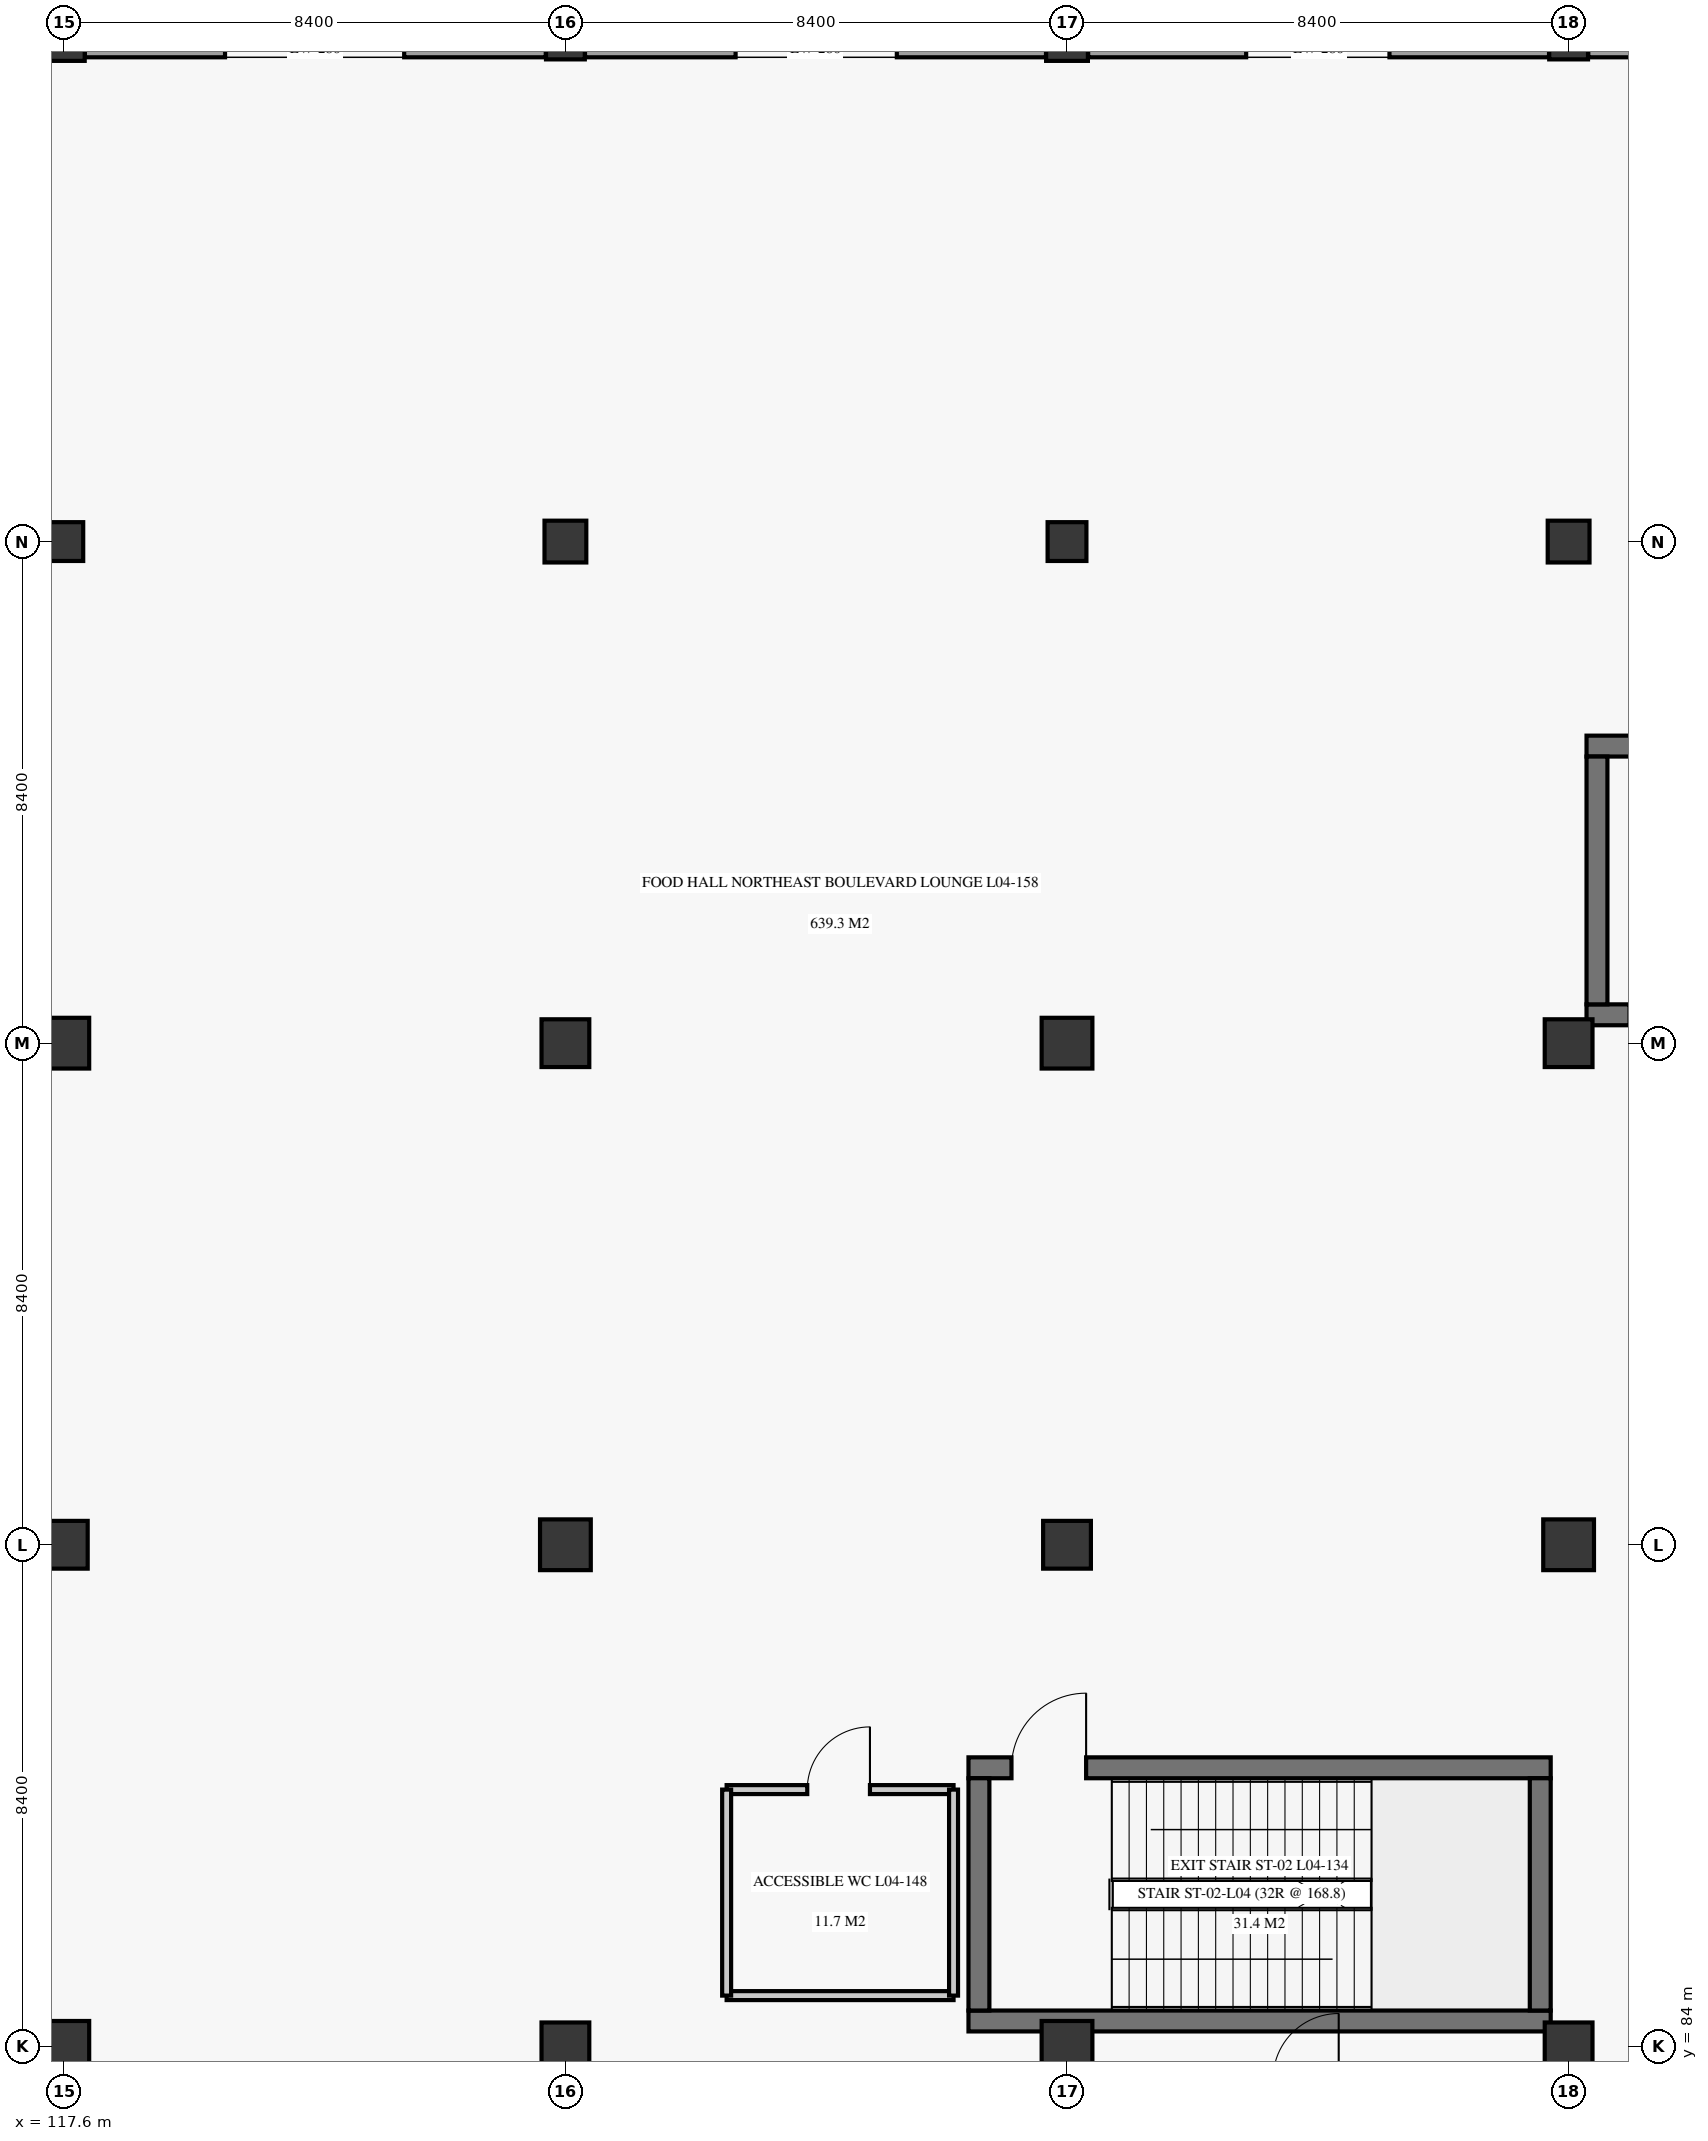
"""IFC4 building model, lengths in metres.
Left out: names, types, materials, properties, quantities, classifications, styles, units other than length and angle.
Written with IfcOpenShell. Run it as: python <this file> out.ifc"""

import sys

from ifc_helpers import new_model, si_unit, direction, frame, frame_2d, origin, origin_2d, place, context, subcontext, project, spatial, rectangle, extrude, element, fill, save


model = new_model("IFC4")
c1 = context("Model", 3, precision=1e-05, world=origin(), true_north=direction((0.0, 1.0)))
c2 = subcontext(c1, "Body", "Model", "MODEL_VIEW")
j1 = project(units=[si_unit("LENGTHUNIT", "METRE"), si_unit("PLANEANGLEUNIT", "RADIAN")], contexts=[c1])
p1 = place(None, origin())
s1 = spatial("IfcSite", under=j1, at=p1, CompositionType="ELEMENT")
p2 = place(p1, origin())
s2 = spatial("IfcBuilding", under=s1, at=p2, CompositionType="ELEMENT")
p3 = place(p2, frame((0.0, 0.0, 16.8)))
s3 = spatial("IfcBuildingStorey", under=s2, at=p3, CompositionType="ELEMENT", Elevation=16.8)
p4 = place(p3, frame((117.6, 84.0, 0.0), z_axis=(0.0, 0.0, 1.0), x_axis=(1.0, 0.0, 0.0)))
e1 = element("IfcColumn", 1, at=p4, inside=s3, PredefinedType="COLUMN", context=c2, shape_type="SweptSolid", body=[
    extrude(rectangle(XDim=0.85, YDim=0.85, at=origin_2d()), origin(), (0.0, 0.0, 1.0), 5.1),
])
p5 = place(p3, frame((117.6, 92.4, 0.0), z_axis=(0.0, 0.0, 1.0), x_axis=(1.0, 0.0, 0.0)))
e2 = element("IfcColumn", 2, at=p5, inside=s3, PredefinedType="COLUMN", context=c2, shape_type="SweptSolid", body=[
    extrude(rectangle(XDim=0.8, YDim=0.8, at=origin_2d()), origin(), (0.0, 0.0, 1.0), 5.1),
])
p6 = place(p3, frame((117.6, 100.8, 0.0), z_axis=(0.0, 0.0, 1.0), x_axis=(1.0, 0.0, 0.0)))
e3 = element("IfcColumn", 3, at=p6, inside=s3, PredefinedType="COLUMN", context=c2, shape_type="SweptSolid", body=[
    extrude(rectangle(XDim=0.85, YDim=0.85, at=origin_2d()), origin(), (0.0, 0.0, 1.0), 5.1),
])
p7 = place(p3, frame((117.6, 109.2, 0.0), z_axis=(0.0, 0.0, 1.0), x_axis=(1.0, 0.0, 0.0)))
e4 = element("IfcColumn", 4, at=p7, inside=s3, PredefinedType="COLUMN", context=c2, shape_type="SweptSolid", body=[
    extrude(rectangle(XDim=0.65, YDim=0.65, at=origin_2d()), origin(), (0.0, 0.0, 1.0), 5.1),
])
p8 = place(p3, frame((117.6, 117.6, 0.0), z_axis=(0.0, 0.0, 1.0), x_axis=(1.0, 0.0, 0.0)))
e5 = element("IfcColumn", 5, at=p8, inside=s3, PredefinedType="COLUMN", context=c2, shape_type="SweptSolid", body=[
    extrude(rectangle(XDim=0.7, YDim=0.7, at=origin_2d()), origin(), (0.0, 0.0, 1.0), 5.1),
])
p9 = place(p3, frame((126.0, 84.0, 0.0), z_axis=(0.0, 0.0, 1.0), x_axis=(1.0, 0.0, 0.0)))
e6 = element("IfcColumn", 6, at=p9, inside=s3, PredefinedType="COLUMN", context=c2, shape_type="SweptSolid", body=[
    extrude(rectangle(XDim=0.8, YDim=0.8, at=origin_2d()), origin(), (0.0, 0.0, 1.0), 5.1),
])
p10 = place(p3, frame((126.0, 92.4, 0.0), z_axis=(0.0, 0.0, 1.0), x_axis=(1.0, 0.0, 0.0)))
e7 = element("IfcColumn", 7, at=p10, inside=s3, PredefinedType="COLUMN", context=c2, shape_type="SweptSolid", body=[
    extrude(rectangle(XDim=0.85, YDim=0.85, at=origin_2d()), origin(), (0.0, 0.0, 1.0), 5.1),
])
p11 = place(p3, frame((126.0, 100.8, 0.0), z_axis=(0.0, 0.0, 1.0), x_axis=(1.0, 0.0, 0.0)))
e8 = element("IfcColumn", 8, at=p11, inside=s3, PredefinedType="COLUMN", context=c2, shape_type="SweptSolid", body=[
    extrude(rectangle(XDim=0.8, YDim=0.8, at=origin_2d()), origin(), (0.0, 0.0, 1.0), 5.1),
])
p12 = place(p3, frame((126.0, 109.2, 0.0), z_axis=(0.0, 0.0, 1.0), x_axis=(1.0, 0.0, 0.0)))
e9 = element("IfcColumn", 9, at=p12, inside=s3, PredefinedType="COLUMN", context=c2, shape_type="SweptSolid", body=[
    extrude(rectangle(XDim=0.7, YDim=0.7, at=origin_2d()), origin(), (0.0, 0.0, 1.0), 5.1),
])
p13 = place(p3, frame((126.0, 117.6, 0.0), z_axis=(0.0, 0.0, 1.0), x_axis=(1.0, 0.0, 0.0)))
e10 = element("IfcColumn", 10, at=p13, inside=s3, PredefinedType="COLUMN", context=c2, shape_type="SweptSolid", body=[
    extrude(rectangle(XDim=0.65, YDim=0.65, at=origin_2d()), origin(), (0.0, 0.0, 1.0), 5.1),
])
p14 = place(p3, frame((134.4, 84.0, 0.0), z_axis=(0.0, 0.0, 1.0), x_axis=(1.0, 0.0, 0.0)))
e11 = element("IfcColumn", 11, at=p14, inside=s3, PredefinedType="COLUMN", context=c2, shape_type="SweptSolid", body=[
    extrude(rectangle(XDim=0.85, YDim=0.85, at=origin_2d()), origin(), (0.0, 0.0, 1.0), 5.1),
])
p15 = place(p3, frame((134.4, 92.4, 0.0), z_axis=(0.0, 0.0, 1.0), x_axis=(1.0, 0.0, 0.0)))
e12 = element("IfcColumn", 12, at=p15, inside=s3, PredefinedType="COLUMN", context=c2, shape_type="SweptSolid", body=[
    extrude(rectangle(XDim=0.8, YDim=0.8, at=origin_2d()), origin(), (0.0, 0.0, 1.0), 5.1),
])
p16 = place(p3, frame((134.4, 100.8, 0.0), z_axis=(0.0, 0.0, 1.0), x_axis=(1.0, 0.0, 0.0)))
e13 = element("IfcColumn", 13, at=p16, inside=s3, PredefinedType="COLUMN", context=c2, shape_type="SweptSolid", body=[
    extrude(rectangle(XDim=0.85, YDim=0.85, at=origin_2d()), origin(), (0.0, 0.0, 1.0), 5.1),
])
p17 = place(p3, frame((134.4, 109.2, 0.0), z_axis=(0.0, 0.0, 1.0), x_axis=(1.0, 0.0, 0.0)))
e14 = element("IfcColumn", 14, at=p17, inside=s3, PredefinedType="COLUMN", context=c2, shape_type="SweptSolid", body=[
    extrude(rectangle(XDim=0.65, YDim=0.65, at=origin_2d()), origin(), (0.0, 0.0, 1.0), 5.1),
])
p18 = place(p3, frame((134.4, 117.6, 0.0), z_axis=(0.0, 0.0, 1.0), x_axis=(1.0, 0.0, 0.0)))
e15 = element("IfcColumn", 15, at=p18, inside=s3, PredefinedType="COLUMN", context=c2, shape_type="SweptSolid", body=[
    extrude(rectangle(XDim=0.7, YDim=0.7, at=origin_2d()), origin(), (0.0, 0.0, 1.0), 5.1),
])
p19 = place(p3, frame((142.8, 84.0, 0.0), z_axis=(0.0, 0.0, 1.0), x_axis=(1.0, 0.0, 0.0)))
e16 = element("IfcColumn", 16, at=p19, inside=s3, PredefinedType="COLUMN", context=c2, shape_type="SweptSolid", body=[
    extrude(rectangle(XDim=0.8, YDim=0.8, at=origin_2d()), origin(), (0.0, 0.0, 1.0), 5.1),
])
p20 = place(p3, frame((142.8, 92.4, 0.0), z_axis=(0.0, 0.0, 1.0), x_axis=(1.0, 0.0, 0.0)))
e17 = element("IfcColumn", 17, at=p20, inside=s3, PredefinedType="COLUMN", context=c2, shape_type="SweptSolid", body=[
    extrude(rectangle(XDim=0.85, YDim=0.85, at=origin_2d()), origin(), (0.0, 0.0, 1.0), 5.1),
])
p21 = place(p3, frame((142.8, 100.8, 0.0), z_axis=(0.0, 0.0, 1.0), x_axis=(1.0, 0.0, 0.0)))
e18 = element("IfcColumn", 18, at=p21, inside=s3, PredefinedType="COLUMN", context=c2, shape_type="SweptSolid", body=[
    extrude(rectangle(XDim=0.8, YDim=0.8, at=origin_2d()), origin(), (0.0, 0.0, 1.0), 5.1),
])
p22 = place(p3, frame((142.8, 109.2, 0.0), z_axis=(0.0, 0.0, 1.0), x_axis=(1.0, 0.0, 0.0)))
e19 = element("IfcColumn", 19, at=p22, inside=s3, PredefinedType="COLUMN", context=c2, shape_type="SweptSolid", body=[
    extrude(rectangle(XDim=0.7, YDim=0.7, at=origin_2d()), origin(), (0.0, 0.0, 1.0), 5.1),
])
p23 = place(p3, frame((142.8, 117.6, 0.0), z_axis=(0.0, 0.0, 1.0), x_axis=(1.0, 0.0, 0.0)))
e20 = element("IfcColumn", 20, at=p23, inside=s3, PredefinedType="COLUMN", context=c2, shape_type="SweptSolid", body=[
    extrude(rectangle(XDim=0.65, YDim=0.65, at=origin_2d()), origin(), (0.0, 0.0, 1.0), 5.1),
])
p24 = place(p3, frame((117.952, 117.45, 0.0), z_axis=(0.0, 0.0, 1.0), x_axis=(1.0, 0.0, 0.0)))
e21 = element("IfcWall", 21, at=p24, inside=s3, PredefinedType="SOLIDWALL", context=c2, shape_type="SweptSolid", body=[
    extrude(rectangle(XDim=7.72, YDim=0.28, at=frame_2d((3.86, 0.0))), origin(), (0.0, 0.0, 1.0), 4.38),
])
p25 = place(p24, frame((2.348, 0.0, 0.95)))
e22 = element("IfcOpeningElement", 22, at=p25, cuts=e21, PredefinedType="OPENING", context=c2, shape_type="SweptSolid", body=[
    extrude(rectangle(XDim=3.0, YDim=2.25, at=frame_2d((1.5, 1.125))), frame((0.0, 0.15, 0.0), z_axis=(0.0, -1.0, 0.0), x_axis=(1.0, 0.0, 0.0)), (0.0, 0.0, 1.0), 0.3),
])
p26 = place(p3, frame((126.328, 117.45, 0.0), z_axis=(0.0, 0.0, 1.0), x_axis=(1.0, 0.0, 0.0)))
e23 = element("IfcWall", 23, at=p26, inside=s3, PredefinedType="SOLIDWALL", context=c2, shape_type="SweptSolid", body=[
    extrude(rectangle(XDim=7.72, YDim=0.28, at=frame_2d((3.86, 0.0))), origin(), (0.0, 0.0, 1.0), 4.38),
])
p27 = place(p26, frame((2.522, 0.0, 0.95)))
e24 = element("IfcOpeningElement", 24, at=p27, cuts=e23, PredefinedType="OPENING", context=c2, shape_type="SweptSolid", body=[
    extrude(rectangle(XDim=2.7, YDim=2.2, at=frame_2d((1.35, 1.1))), frame((0.0, 0.15, 0.0), z_axis=(0.0, -1.0, 0.0), x_axis=(1.0, 0.0, 0.0)), (0.0, 0.0, 1.0), 0.3),
])
p28 = place(p3, frame((134.754, 117.45, 0.0), z_axis=(0.0, 0.0, 1.0), x_axis=(1.0, 0.0, 0.0)))
e25 = element("IfcWall", 25, at=p28, inside=s3, PredefinedType="SOLIDWALL", context=c2, shape_type="SweptSolid", body=[
    extrude(rectangle(XDim=7.718, YDim=0.28, at=frame_2d((3.859, 0.0))), origin(), (0.0, 0.0, 1.0), 4.38),
])
p29 = place(p28, frame((2.646, 0.0, 0.95)))
e26 = element("IfcOpeningElement", 26, at=p29, cuts=e25, PredefinedType="OPENING", context=c2, shape_type="SweptSolid", body=[
    extrude(rectangle(XDim=2.4, YDim=2.2, at=frame_2d((1.2, 1.1))), frame((0.0, 0.15, 0.0), z_axis=(0.0, -1.0, 0.0), x_axis=(1.0, 0.0, 0.0)), (0.0, 0.0, 1.0), 0.3),
])
p30 = place(p3, frame((143.128, 117.45, 0.0), z_axis=(0.0, 0.0, 1.0), x_axis=(1.0, 0.0, 0.0)))
e27 = element("IfcWall", 27, at=p30, inside=s3, PredefinedType="SOLIDWALL", context=c2, shape_type="SweptSolid", body=[
    extrude(rectangle(XDim=7.718, YDim=0.28, at=frame_2d((3.859, 0.0))), origin(), (0.0, 0.0, 1.0), 4.38),
])
p31 = place(p30, frame((2.822, 0.0, 0.95)))
e28 = element("IfcOpeningElement", 28, at=p31, cuts=e27, PredefinedType="OPENING", context=c2, shape_type="SweptSolid", body=[
    extrude(rectangle(XDim=2.1, YDim=2.1, at=frame_2d((1.05, 1.05))), frame((0.0, 0.15, 0.0), z_axis=(0.0, -1.0, 0.0), x_axis=(1.0, 0.0, 0.0)), (0.0, 0.0, 1.0), 0.3),
])
p32 = place(p3, frame((132.75, 84.425, 0.0), z_axis=(0.0, 0.0, 1.0), x_axis=(1.0, 0.0, 0.0)))
e29 = element("IfcWall", 29, at=p32, inside=s3, PredefinedType="SHEAR", context=c2, shape_type="SweptSolid", body=[
    extrude(rectangle(XDim=9.75, YDim=0.35, at=frame_2d((4.875, 0.0))), origin(), (0.0, 0.0, 1.0), 5.1),
])
p33 = place(p3, frame((132.75, 88.665, 0.0), z_axis=(0.0, 0.0, 1.0), x_axis=(1.0, 0.0, 0.0)))
e30 = element("IfcWall", 30, at=p33, inside=s3, PredefinedType="SHEAR", context=c2, shape_type="SweptSolid", body=[
    extrude(rectangle(XDim=9.75, YDim=0.35, at=frame_2d((4.875, 0.0))), origin(), (0.0, 0.0, 1.0), 5.1),
])
p34 = place(p33, frame((0.72, 0.0, 0.0)))
e31 = element("IfcOpeningElement", 31, at=p34, cuts=e30, PredefinedType="OPENING", context=c2, shape_type="SweptSolid", body=[
    extrude(rectangle(XDim=1.25, YDim=2.2, at=frame_2d((0.625, 1.1))), frame((0.0, 0.185, 0.0), z_axis=(0.0, -1.0, 0.0), x_axis=(1.0, 0.0, 0.0)), (0.0, 0.0, 1.0), 0.37),
])
for number, where, z_axis, x_axis in (
    (32, (132.925, 84.6, 0.0), (0.0, 0.0, 1.0), (0.0, 1.0, 0.0)),
    (33, (142.325, 84.6, 0.0), (0.0, 0.0, 1.0), (0.0, 1.0, 0.0)),
):
    element("IfcWall", number, at=place(p3, frame(where, z_axis=z_axis, x_axis=x_axis)), inside=s3, PredefinedType="SHEAR", context=c2, shape_type="SweptSolid", body=[
        extrude(rectangle(XDim=3.89, YDim=0.35, at=frame_2d((1.945, 0.0))), origin(), (0.0, 0.0, 1.0), 5.1),
    ])
p35 = place(p3, frame((143.1, 101.275, 0.0), z_axis=(0.0, 0.0, 1.0), x_axis=(1.0, 0.0, 0.0)))
e34 = element("IfcWall", 34, at=p35, inside=s3, PredefinedType="SHEAR", context=c2, shape_type="SweptSolid", body=[
    extrude(rectangle(XDim=9.75, YDim=0.35, at=frame_2d((4.875, 0.0))), origin(), (0.0, 0.0, 1.0), 5.1),
])
p36 = place(p35, frame((0.72, 0.0, 0.0)))
e35 = element("IfcOpeningElement", 35, at=p36, cuts=e34, PredefinedType="OPENING", context=c2, shape_type="SweptSolid", body=[
    extrude(rectangle(XDim=1.35, YDim=2.25, at=frame_2d((0.675, 1.125))), frame((0.0, 0.185, 0.0), z_axis=(0.0, -1.0, 0.0), x_axis=(1.0, 0.0, 0.0)), (0.0, 0.0, 1.0), 0.37),
])
p37 = place(p3, frame((143.1, 105.775, 0.0), z_axis=(0.0, 0.0, 1.0), x_axis=(1.0, 0.0, 0.0)))
e36 = element("IfcWall", 36, at=p37, inside=s3, PredefinedType="SHEAR", context=c2, shape_type="SweptSolid", body=[
    extrude(rectangle(XDim=9.75, YDim=0.35, at=frame_2d((4.875, 0.0))), origin(), (0.0, 0.0, 1.0), 5.1),
])
p38 = place(p3, frame((143.275, 101.45, 0.0), z_axis=(0.0, 0.0, 1.0), x_axis=(0.0, 1.0, 0.0)))
e37 = element("IfcWall", 37, at=p38, inside=s3, PredefinedType="SHEAR", context=c2, shape_type="SweptSolid", body=[
    extrude(rectangle(XDim=4.15, YDim=0.35, at=frame_2d((2.075, 0.0))), origin(), (0.0, 0.0, 1.0), 5.1),
])
p39 = place(p3, frame((128.7, 88.3, 0.0), z_axis=(0.0, 0.0, 1.0), x_axis=(1.0, 0.0, 0.0)))
e38 = element("IfcWall", 38, at=p39, inside=s3, PredefinedType="PARTITIONING", context=c2, shape_type="SweptSolid", body=[
    extrude(rectangle(XDim=3.8, YDim=0.15, at=frame_2d((1.9, 0.0))), origin(), (0.0, 0.0, 1.0), 4.72),
])
p40 = place(p39, frame((1.35, 0.0, 0.0)))
e39 = element("IfcOpeningElement", 39, at=p40, cuts=e38, PredefinedType="OPENING", context=c2, shape_type="SweptSolid", body=[
    extrude(rectangle(XDim=1.05, YDim=2.15, at=frame_2d((0.525, 1.075))), frame((0.0, 0.085, 0.0), z_axis=(0.0, -1.0, 0.0), x_axis=(1.0, 0.0, 0.0)), (0.0, 0.0, 1.0), 0.17),
])
p41 = place(p3, frame((128.7, 84.85, 0.0), z_axis=(0.0, 0.0, 1.0), x_axis=(1.0, 0.0, 0.0)))
e40 = element("IfcWall", 40, at=p41, inside=s3, PredefinedType="PARTITIONING", context=c2, shape_type="SweptSolid", body=[
    extrude(rectangle(XDim=3.8, YDim=0.15, at=frame_2d((1.9, 0.0))), origin(), (0.0, 0.0, 1.0), 4.72),
])
for number, where, z_axis, x_axis in (
    (41, (128.7, 84.85, 0.0), (0.0, 0.0, 1.0), (0.0, 1.0, 0.0)),
    (42, (132.5, 84.85, 0.0), (0.0, 0.0, 1.0), (0.0, 1.0, 0.0)),
):
    element("IfcWall", number, at=place(p3, frame(where, z_axis=z_axis, x_axis=x_axis)), inside=s3, PredefinedType="PARTITIONING", context=c2, shape_type="SweptSolid", body=[
        extrude(rectangle(XDim=3.45, YDim=0.15, at=frame_2d((1.725, 0.0))), origin(), (0.0, 0.0, 1.0), 4.72),
    ])
p42 = place(p34, origin())
e43 = element("IfcDoor", 43, at=p42, inside=s3, OperationType="SINGLE_SWING_RIGHT", PredefinedType="DOOR", context=c2, shape_type="SweptSolid", body=[
    extrude(rectangle(XDim=1.25, YDim=2.2, at=frame_2d((0.625, 1.1))), frame((0.0, 0.025, 0.0), z_axis=(0.0, -1.0, 0.0), x_axis=(1.0, 0.0, 0.0)), (0.0, 0.0, 1.0), 0.05),
])
fill(e31, e43)
p43 = place(p40, origin())
e44 = element("IfcDoor", 44, at=p43, inside=s3, OperationType="SINGLE_SWING_RIGHT", PredefinedType="DOOR", context=c2, shape_type="SweptSolid", body=[
    extrude(rectangle(XDim=1.05, YDim=2.15, at=frame_2d((0.525, 1.075))), frame((0.0, 0.025, 0.0), z_axis=(0.0, -1.0, 0.0), x_axis=(1.0, 0.0, 0.0)), (0.0, 0.0, 1.0), 0.05),
])
fill(e39, e44)
save(model, sys.argv[1])
